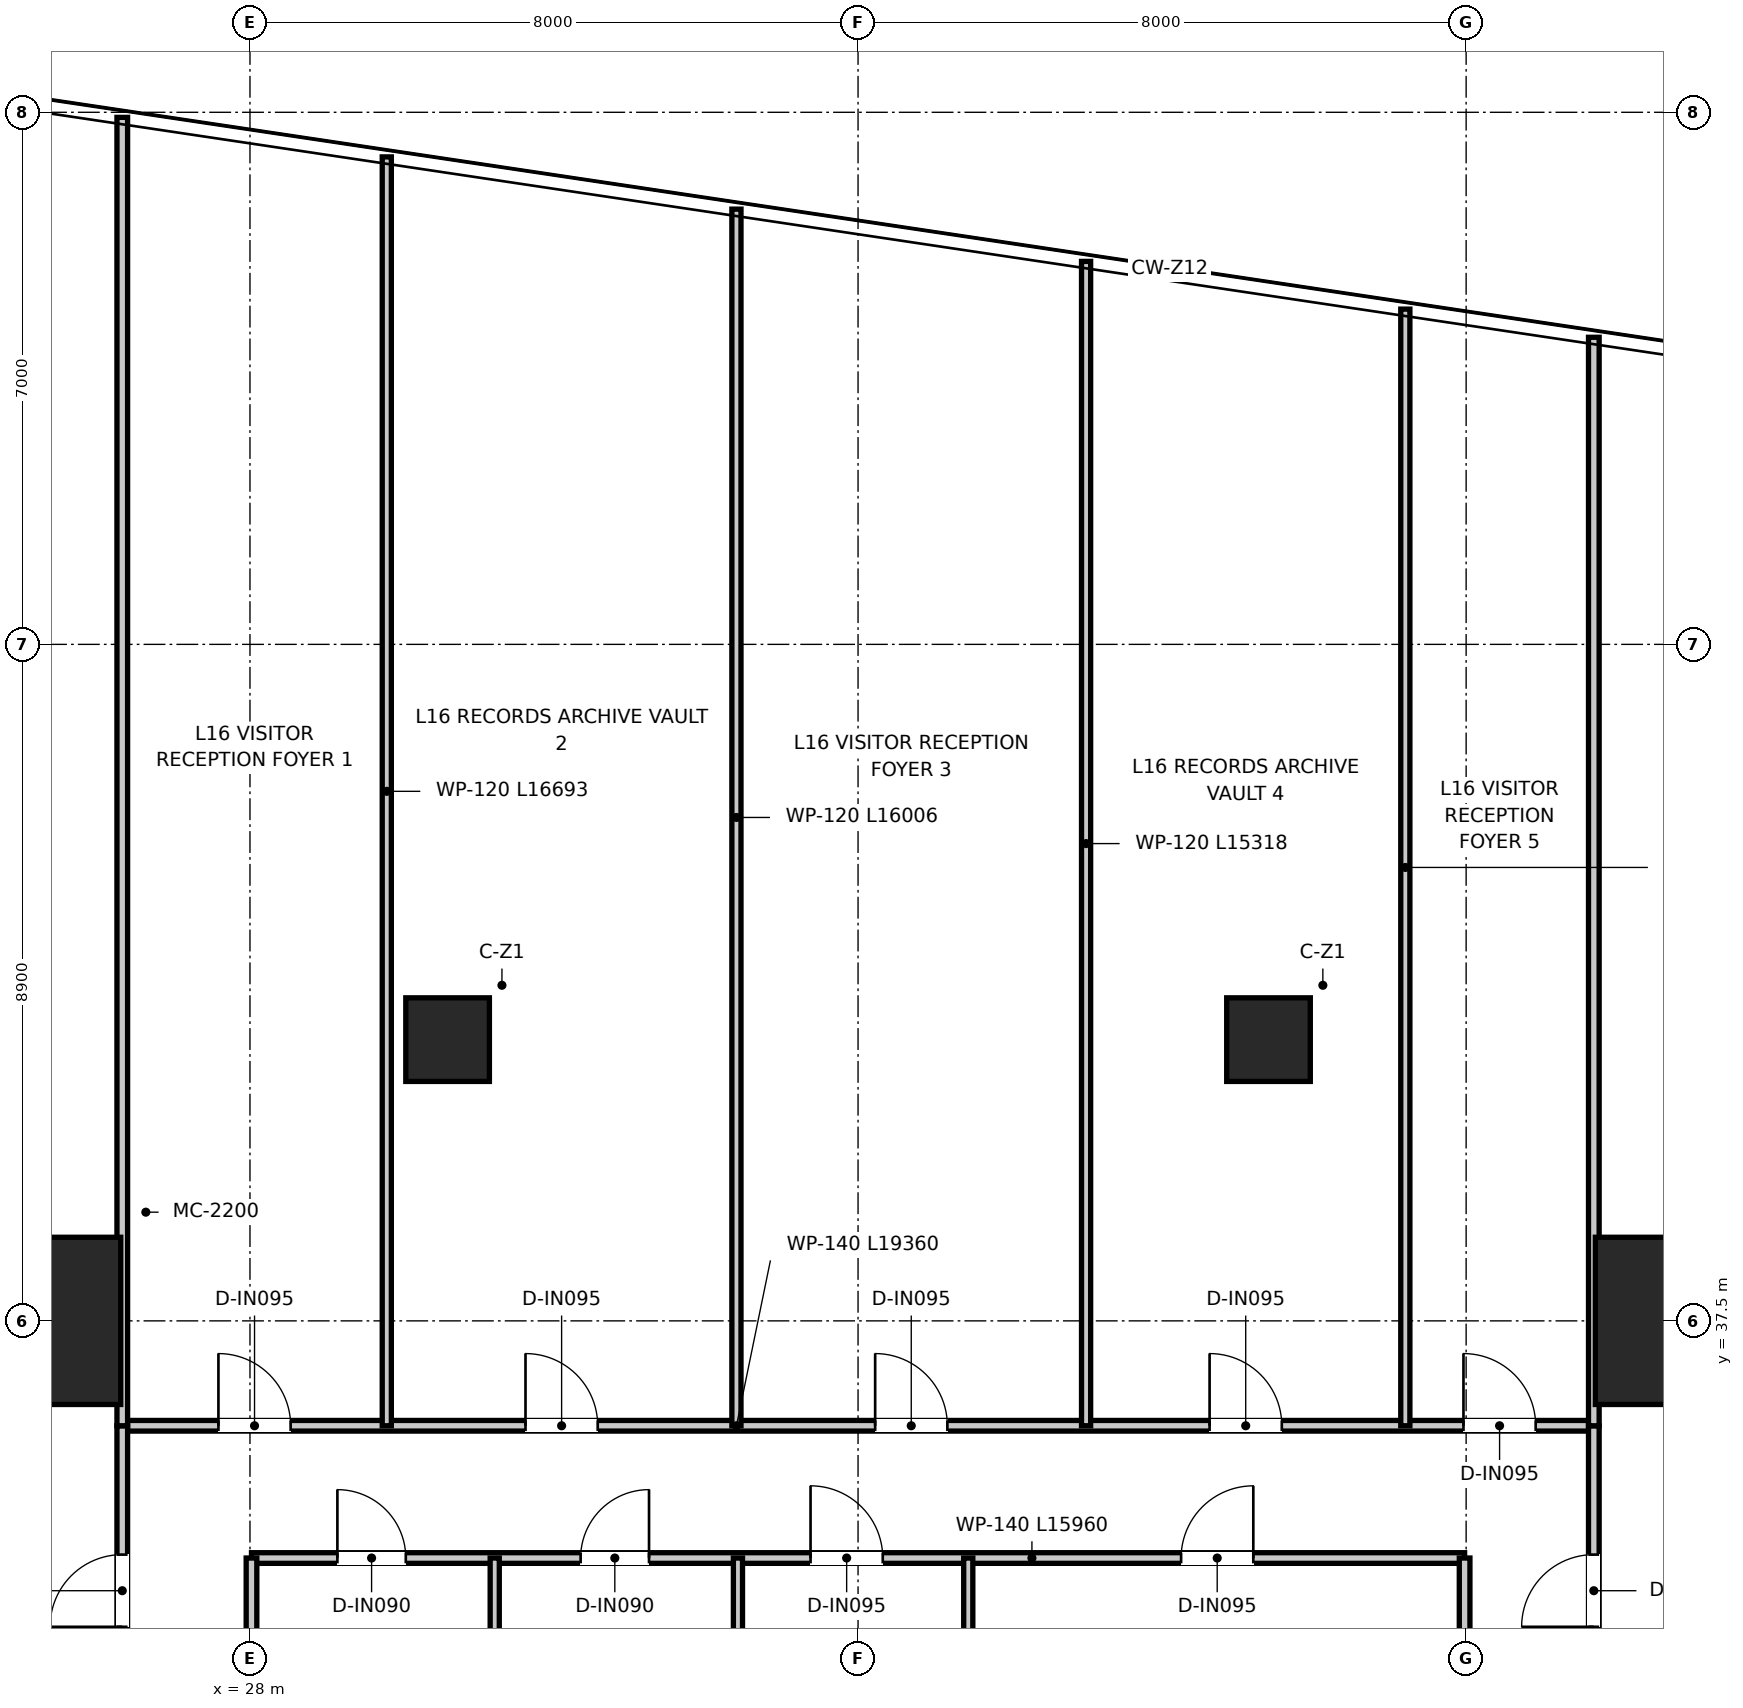
"""IFC4 building model, lengths in metres.
Left out: names, types, materials, properties, quantities, classifications, styles, units other than length and angle.
Written with IfcOpenShell. Run it as: python <this file> out.ifc"""

import sys

from ifc_helpers import new_model, si_unit, direction, frame, frame_2d, origin, origin_2d, place, context, subcontext, project, spatial, rectangle, extrude, source, transform, mapped, element, fill, save


model = new_model("IFC4")
c1 = context("Model", 3, precision=1e-05, world=origin(), true_north=direction((0.0, 1.0)))
c2 = subcontext(c1, "Body", "Model", "MODEL_VIEW")
j1 = project(units=[si_unit("LENGTHUNIT", "METRE"), si_unit("PLANEANGLEUNIT", "RADIAN")], contexts=[c1])
p1 = place(None, origin())
s1 = spatial("IfcSite", under=j1, at=p1, CompositionType="ELEMENT")
p2 = place(p1, origin())
s2 = spatial("IfcBuilding", under=s1, at=p2, CompositionType="ELEMENT")
p3 = place(p2, frame((0.0, 0.0, 68.45)))
s3 = spatial("IfcBuildingStorey", under=s2, at=p3, CompositionType="ELEMENT", Elevation=68.45)
m1 = source(origin(), c2, "Body", "SweptSolid", [
    extrude(rectangle(XDim=2.2, YDim=2.2, at=origin_2d()), origin(), (0.0, 0.0, 1.0), 3.95),
])
for number, where, z_axis, x_axis in (
    (1, (46.8, 37.5, 0.0), (0.0, 0.0, 1.0), (1.0, 0.0, 0.0)),
    (2, (25.2, 37.5, 0.0), (0.0, 0.0, 1.0), (1.0, 0.0, 0.0)),
):
    element("IfcColumn", number, at=place(p3, frame(where, z_axis=z_axis, x_axis=x_axis)), inside=s3, PredefinedType="USERDEFINED", context=c2, shape_type="MappedRepresentation", body=[
        mapped(m1, transform((0.0, 0.0, 0.0), x_axis=(1.0, 0.0, 0.0), y_axis=(0.0, 1.0, 0.0), z_axis=(0.0, 0.0, 1.0), scale=1.0)),
    ])
m2 = source(origin(), c2, "Body", "SweptSolid", [
    extrude(rectangle(XDim=1.1, YDim=1.1, at=origin_2d()), origin(), (0.0, 0.0, 1.0), 3.95),
])
for number, where, z_axis, x_axis in (
    (3, (30.6, 41.2, 0.0), (0.0, 0.0, 1.0), (1.0, 0.0, 0.0)),
    (4, (41.4, 41.2, 0.0), (0.0, 0.0, 1.0), (1.0, 0.0, 0.0)),
):
    element("IfcColumn", number, at=place(p3, frame(where, z_axis=z_axis, x_axis=x_axis)), inside=s3, PredefinedType="COLUMN", context=c2, shape_type="MappedRepresentation", body=[
        mapped(m2, transform((0.0, 0.0, 0.0), x_axis=(1.0, 0.0, 0.0), y_axis=(0.0, 1.0, 0.0), z_axis=(0.0, 0.0, 1.0), scale=1.0)),
    ])
p4 = place(p3, frame((28.02, 34.38, 0.0), z_axis=(0.0, 0.0, 1.0), x_axis=(1.0, 0.0, 0.0)))
e5 = element("IfcWall", 5, at=p4, inside=s3, PredefinedType="PARTITIONING", context=c2, shape_type="SweptSolid", body=[
    extrude(rectangle(XDim=15.96, YDim=0.14, at=frame_2d((7.98, 0.0))), origin(), (0.0, 0.0, 1.0), 3.08),
])
p5 = place(p4, frame((1.13, 0.0, 0.0)))
e6 = element("IfcOpeningElement", 6, at=p5, cuts=e5, PredefinedType="OPENING", context=c2, shape_type="SweptSolid", body=[
    extrude(rectangle(XDim=0.9, YDim=2.1, at=frame_2d((0.45, 1.05))), frame((0.0, 0.08, 0.0), z_axis=(0.0, -1.0, 0.0), x_axis=(1.0, 0.0, 0.0)), (0.0, 0.0, 1.0), 0.16),
])
p6 = place(p4, frame((4.33, 0.0, 0.0)))
e7 = element("IfcOpeningElement", 7, at=p6, cuts=e5, PredefinedType="OPENING", context=c2, shape_type="SweptSolid", body=[
    extrude(rectangle(XDim=0.9, YDim=2.1, at=frame_2d((0.45, 1.05))), frame((0.0, 0.08, 0.0), z_axis=(0.0, -1.0, 0.0), x_axis=(1.0, 0.0, 0.0)), (0.0, 0.0, 1.0), 0.16),
])
p7 = place(p4, frame((7.355, 0.0, 0.0)))
e8 = element("IfcOpeningElement", 8, at=p7, cuts=e5, PredefinedType="OPENING", context=c2, shape_type="SweptSolid", body=[
    extrude(rectangle(XDim=0.95, YDim=2.1, at=frame_2d((0.475, 1.05))), frame((0.0, 0.08, 0.0), z_axis=(0.0, -1.0, 0.0), x_axis=(1.0, 0.0, 0.0)), (0.0, 0.0, 1.0), 0.16),
])
p8 = place(p4, frame((12.23, 0.0, 0.0)))
e9 = element("IfcOpeningElement", 9, at=p8, cuts=e5, PredefinedType="OPENING", context=c2, shape_type="SweptSolid", body=[
    extrude(rectangle(XDim=0.95, YDim=2.1, at=frame_2d((0.475, 1.05))), frame((0.0, 0.08, 0.0), z_axis=(0.0, -1.0, 0.0), x_axis=(1.0, 0.0, 0.0)), (0.0, 0.0, 1.0), 0.16),
])
for number, where, z_axis, x_axis in (
    (10, (28.02, 28.64, 0.0), (0.0, 0.0, 1.0), (0.0, 1.0, 0.0)),
    (11, (43.98, 28.64, 0.0), (0.0, 0.0, 1.0), (0.0, 1.0, 0.0)),
):
    element("IfcWall", number, at=place(p3, frame(where, z_axis=z_axis, x_axis=x_axis)), inside=s3, PredefinedType="PARTITIONING", context=c2, shape_type="SweptSolid", body=[
        extrude(rectangle(XDim=5.74, YDim=0.14, at=frame_2d((2.87, 0.0))), origin(), (0.0, 0.0, 1.0), 3.22),
    ])
for number, where, z_axis, x_axis in (
    (12, (31.22, 30.74, 0.0), (0.0, 0.0, 1.0), (0.0, 1.0, 0.0)),
    (13, (34.42, 30.74, 0.0), (0.0, 0.0, 1.0), (0.0, 1.0, 0.0)),
    (14, (37.45, 30.74, 0.0), (0.0, 0.0, 1.0), (0.0, 1.0, 0.0)),
):
    element("IfcWall", number, at=place(p3, frame(where, z_axis=z_axis, x_axis=x_axis)), inside=s3, PredefinedType="PARTITIONING", context=c2, shape_type="SweptSolid", body=[
        extrude(rectangle(XDim=3.64, YDim=0.12, at=frame_2d((1.82, 0.0))), origin(), (0.0, 0.0, 1.0), 3.12),
    ])
p9 = place(p3, frame((26.32, 36.12, 0.0), z_axis=(0.0, 0.0, 1.0), x_axis=(1.0, 0.0, 0.0)))
e15 = element("IfcWall", 15, at=p9, inside=s3, PredefinedType="PARTITIONING", context=c2, shape_type="SweptSolid", body=[
    extrude(rectangle(XDim=19.36, YDim=0.14, at=frame_2d((9.68, 0.0))), origin(), (0.0, 0.0, 1.0), 3.08),
])
p10 = place(p9, frame((1.265, 0.0, 0.0)))
e16 = element("IfcOpeningElement", 16, at=p10, cuts=e15, PredefinedType="OPENING", context=c2, shape_type="SweptSolid", body=[
    extrude(rectangle(XDim=0.95, YDim=2.1, at=frame_2d((0.475, 1.05))), frame((0.0, 0.08, 0.0), z_axis=(0.0, -1.0, 0.0), x_axis=(1.0, 0.0, 0.0)), (0.0, 0.0, 1.0), 0.16),
])
p11 = place(p9, frame((5.305, 0.0, 0.0)))
e17 = element("IfcOpeningElement", 17, at=p11, cuts=e15, PredefinedType="OPENING", context=c2, shape_type="SweptSolid", body=[
    extrude(rectangle(XDim=0.95, YDim=2.1, at=frame_2d((0.475, 1.05))), frame((0.0, 0.08, 0.0), z_axis=(0.0, -1.0, 0.0), x_axis=(1.0, 0.0, 0.0)), (0.0, 0.0, 1.0), 0.16),
])
p12 = place(p9, frame((9.905, 0.0, 0.0)))
e18 = element("IfcOpeningElement", 18, at=p12, cuts=e15, PredefinedType="OPENING", context=c2, shape_type="SweptSolid", body=[
    extrude(rectangle(XDim=0.95, YDim=2.1, at=frame_2d((0.475, 1.05))), frame((0.0, 0.08, 0.0), z_axis=(0.0, -1.0, 0.0), x_axis=(1.0, 0.0, 0.0)), (0.0, 0.0, 1.0), 0.16),
])
p13 = place(p9, frame((14.305, 0.0, 0.0)))
e19 = element("IfcOpeningElement", 19, at=p13, cuts=e15, PredefinedType="OPENING", context=c2, shape_type="SweptSolid", body=[
    extrude(rectangle(XDim=0.95, YDim=2.1, at=frame_2d((0.475, 1.05))), frame((0.0, 0.08, 0.0), z_axis=(0.0, -1.0, 0.0), x_axis=(1.0, 0.0, 0.0)), (0.0, 0.0, 1.0), 0.16),
])
p14 = place(p9, frame((17.645, 0.0, 0.0)))
e20 = element("IfcOpeningElement", 20, at=p14, cuts=e15, PredefinedType="OPENING", context=c2, shape_type="SweptSolid", body=[
    extrude(rectangle(XDim=0.95, YDim=2.1, at=frame_2d((0.475, 1.05))), frame((0.0, 0.08, 0.0), z_axis=(0.0, -1.0, 0.0), x_axis=(1.0, 0.0, 0.0)), (0.0, 0.0, 1.0), 0.16),
])
p15 = place(p3, frame((26.32, 10.5, 0.0), z_axis=(0.0, 0.0, 1.0), x_axis=(0.0, 1.0, 0.0)))
e21 = element("IfcWall", 21, at=p15, inside=s3, PredefinedType="PARTITIONING", context=c2, shape_type="SweptSolid", body=[
    extrude(rectangle(XDim=25.62, YDim=0.14, at=frame_2d((12.81, 0.0))), origin(), (0.0, 0.0, 1.0), 2.97),
])
p16 = place(p15, frame((7.775, 0.0, 0.0)))
e22 = element("IfcOpeningElement", 22, at=p16, cuts=e21, PredefinedType="OPENING", context=c2, shape_type="SweptSolid", body=[
    extrude(rectangle(XDim=0.95, YDim=2.1, at=frame_2d((0.475, 1.05))), frame((0.0, 0.08, 0.0), z_axis=(0.0, -1.0, 0.0), x_axis=(1.0, 0.0, 0.0)), (0.0, 0.0, 1.0), 0.16),
])
p17 = place(p15, frame((11.275, 0.0, 0.0)))
e23 = element("IfcOpeningElement", 23, at=p17, cuts=e21, PredefinedType="OPENING", context=c2, shape_type="SweptSolid", body=[
    extrude(rectangle(XDim=0.95, YDim=2.1, at=frame_2d((0.475, 1.05))), frame((0.0, 0.08, 0.0), z_axis=(0.0, -1.0, 0.0), x_axis=(1.0, 0.0, 0.0)), (0.0, 0.0, 1.0), 0.16),
])
p18 = place(p15, frame((15.775, 0.0, 0.0)))
e24 = element("IfcOpeningElement", 24, at=p18, cuts=e21, PredefinedType="OPENING", context=c2, shape_type="SweptSolid", body=[
    extrude(rectangle(XDim=0.95, YDim=2.1, at=frame_2d((0.475, 1.05))), frame((0.0, 0.08, 0.0), z_axis=(0.0, -1.0, 0.0), x_axis=(1.0, 0.0, 0.0)), (0.0, 0.0, 1.0), 0.16),
])
p19 = place(p15, frame((20.125, 0.0, 0.0)))
e25 = element("IfcOpeningElement", 25, at=p19, cuts=e21, PredefinedType="OPENING", context=c2, shape_type="SweptSolid", body=[
    extrude(rectangle(XDim=0.95, YDim=2.1, at=frame_2d((0.475, 1.05))), frame((0.0, 0.08, 0.0), z_axis=(0.0, -1.0, 0.0), x_axis=(1.0, 0.0, 0.0)), (0.0, 0.0, 1.0), 0.16),
])
p20 = place(p15, frame((22.975, 0.0, 0.0)))
e26 = element("IfcOpeningElement", 26, at=p20, cuts=e21, PredefinedType="OPENING", context=c2, shape_type="SweptSolid", body=[
    extrude(rectangle(XDim=0.95, YDim=2.1, at=frame_2d((0.475, 1.05))), frame((0.0, 0.08, 0.0), z_axis=(0.0, -1.0, 0.0), x_axis=(1.0, 0.0, 0.0)), (0.0, 0.0, 1.0), 0.16),
])
p21 = place(p3, frame((45.68, 10.5, 0.0), z_axis=(0.0, 0.0, 1.0), x_axis=(0.0, 1.0, 0.0)))
e27 = element("IfcWall", 27, at=p21, inside=s3, PredefinedType="PARTITIONING", context=c2, shape_type="SweptSolid", body=[
    extrude(rectangle(XDim=25.62, YDim=0.14, at=frame_2d((12.81, 0.0))), origin(), (0.0, 0.0, 1.0), 2.97),
])
p22 = place(p21, frame((7.775, 0.0, 0.0)))
e28 = element("IfcOpeningElement", 28, at=p22, cuts=e27, PredefinedType="OPENING", context=c2, shape_type="SweptSolid", body=[
    extrude(rectangle(XDim=0.95, YDim=2.1, at=frame_2d((0.475, 1.05))), frame((0.0, 0.08, 0.0), z_axis=(0.0, -1.0, 0.0), x_axis=(1.0, 0.0, 0.0)), (0.0, 0.0, 1.0), 0.16),
])
p23 = place(p21, frame((11.275, 0.0, 0.0)))
e29 = element("IfcOpeningElement", 29, at=p23, cuts=e27, PredefinedType="OPENING", context=c2, shape_type="SweptSolid", body=[
    extrude(rectangle(XDim=0.95, YDim=2.1, at=frame_2d((0.475, 1.05))), frame((0.0, 0.08, 0.0), z_axis=(0.0, -1.0, 0.0), x_axis=(1.0, 0.0, 0.0)), (0.0, 0.0, 1.0), 0.16),
])
p24 = place(p21, frame((15.775, 0.0, 0.0)))
e30 = element("IfcOpeningElement", 30, at=p24, cuts=e27, PredefinedType="OPENING", context=c2, shape_type="SweptSolid", body=[
    extrude(rectangle(XDim=0.95, YDim=2.1, at=frame_2d((0.475, 1.05))), frame((0.0, 0.08, 0.0), z_axis=(0.0, -1.0, 0.0), x_axis=(1.0, 0.0, 0.0)), (0.0, 0.0, 1.0), 0.16),
])
p25 = place(p21, frame((20.125, 0.0, 0.0)))
e31 = element("IfcOpeningElement", 31, at=p25, cuts=e27, PredefinedType="OPENING", context=c2, shape_type="SweptSolid", body=[
    extrude(rectangle(XDim=0.95, YDim=2.1, at=frame_2d((0.475, 1.05))), frame((0.0, 0.08, 0.0), z_axis=(0.0, -1.0, 0.0), x_axis=(1.0, 0.0, 0.0)), (0.0, 0.0, 1.0), 0.16),
])
p26 = place(p21, frame((22.975, 0.0, 0.0)))
e32 = element("IfcOpeningElement", 32, at=p26, cuts=e27, PredefinedType="OPENING", context=c2, shape_type="SweptSolid", body=[
    extrude(rectangle(XDim=0.95, YDim=2.1, at=frame_2d((0.475, 1.05))), frame((0.0, 0.08, 0.0), z_axis=(0.0, -1.0, 0.0), x_axis=(1.0, 0.0, 0.0)), (0.0, 0.0, 1.0), 0.16),
])
p27 = place(p3, frame((26.32, 36.12, 0.0), z_axis=(0.0, 0.0, 1.0), x_axis=(0.0, 1.0, 0.0)))
e33 = element("IfcWall", 33, at=p27, inside=s3, PredefinedType="PARTITIONING", context=c2, shape_type="SweptSolid", body=[
    extrude(rectangle(XDim=17.213, YDim=0.14, at=frame_2d((8.606, 0.0))), origin(), (0.0, 0.0, 1.0), 2.97),
])
p28 = place(p3, frame((45.68, 36.12, 0.0), z_axis=(0.0, 0.0, 1.0), x_axis=(0.0, 1.0, 0.0)))
e34 = element("IfcWall", 34, at=p28, inside=s3, PredefinedType="PARTITIONING", context=c2, shape_type="SweptSolid", body=[
    extrude(rectangle(XDim=14.32, YDim=0.14, at=frame_2d((7.16, 0.0))), origin(), (0.0, 0.0, 1.0), 2.97),
])
p29 = place(p3, frame((29.8, 36.12, 0.0), z_axis=(0.0, 0.0, 1.0), x_axis=(0.0, 1.0, 0.0)))
e35 = element("IfcWall", 35, at=p29, inside=s3, PredefinedType="PARTITIONING", context=c2, shape_type="SweptSolid", body=[
    extrude(rectangle(XDim=16.693, YDim=0.12, at=frame_2d((8.347, 0.0))), origin(), (0.0, 0.0, 1.0), 2.97),
])
p30 = place(p3, frame((34.4, 36.12, 0.0), z_axis=(0.0, 0.0, 1.0), x_axis=(0.0, 1.0, 0.0)))
e36 = element("IfcWall", 36, at=p30, inside=s3, PredefinedType="PARTITIONING", context=c2, shape_type="SweptSolid", body=[
    extrude(rectangle(XDim=16.006, YDim=0.12, at=frame_2d((8.003, 0.0))), origin(), (0.0, 0.0, 1.0), 2.97),
])
p31 = place(p3, frame((39.0, 36.12, 0.0), z_axis=(0.0, 0.0, 1.0), x_axis=(0.0, 1.0, 0.0)))
e37 = element("IfcWall", 37, at=p31, inside=s3, PredefinedType="PARTITIONING", context=c2, shape_type="SweptSolid", body=[
    extrude(rectangle(XDim=15.318, YDim=0.12, at=frame_2d((7.659, 0.0))), origin(), (0.0, 0.0, 1.0), 2.97),
])
p32 = place(p3, frame((43.2, 36.12, 0.0), z_axis=(0.0, 0.0, 1.0), x_axis=(0.0, 1.0, 0.0)))
e38 = element("IfcWall", 38, at=p32, inside=s3, PredefinedType="PARTITIONING", context=c2, shape_type="SweptSolid", body=[
    extrude(rectangle(XDim=14.69, YDim=0.12, at=frame_2d((7.345, 0.0))), origin(), (0.0, 0.0, 1.0), 2.97),
])
p33 = place(p5, origin())
e39 = element("IfcDoor", 39, at=p33, inside=s3, OperationType="SINGLE_SWING_LEFT", PredefinedType="DOOR", context=c2, shape_type="SweptSolid", body=[
    extrude(rectangle(XDim=0.9, YDim=2.1, at=frame_2d((0.45, 1.05))), frame((0.0, 0.025, 0.0), z_axis=(0.0, -1.0, 0.0), x_axis=(1.0, 0.0, 0.0)), (0.0, 0.0, 1.0), 0.05),
])
fill(e6, e39)
p34 = place(p6, origin())
e40 = element("IfcDoor", 40, at=p34, inside=s3, OperationType="SINGLE_SWING_RIGHT", PredefinedType="DOOR", context=c2, shape_type="SweptSolid", body=[
    extrude(rectangle(XDim=0.9, YDim=2.1, at=frame_2d((0.45, 1.05))), frame((0.0, 0.025, 0.0), z_axis=(0.0, -1.0, 0.0), x_axis=(1.0, 0.0, 0.0)), (0.0, 0.0, 1.0), 0.05),
])
fill(e7, e40)
p35 = place(p7, origin())
e41 = element("IfcDoor", 41, at=p35, inside=s3, OperationType="SINGLE_SWING_LEFT", PredefinedType="DOOR", context=c2, shape_type="SweptSolid", body=[
    extrude(rectangle(XDim=0.95, YDim=2.1, at=frame_2d((0.475, 1.05))), frame((0.0, 0.025, 0.0), z_axis=(0.0, -1.0, 0.0), x_axis=(1.0, 0.0, 0.0)), (0.0, 0.0, 1.0), 0.05),
])
fill(e8, e41)
p36 = place(p8, origin())
e42 = element("IfcDoor", 42, at=p36, inside=s3, OperationType="SINGLE_SWING_RIGHT", PredefinedType="DOOR", context=c2, shape_type="SweptSolid", body=[
    extrude(rectangle(XDim=0.95, YDim=2.1, at=frame_2d((0.475, 1.05))), frame((0.0, 0.025, 0.0), z_axis=(0.0, -1.0, 0.0), x_axis=(1.0, 0.0, 0.0)), (0.0, 0.0, 1.0), 0.05),
])
fill(e9, e42)
p37 = place(p10, origin())
e43 = element("IfcDoor", 43, at=p37, inside=s3, OperationType="SINGLE_SWING_LEFT", PredefinedType="DOOR", context=c2, shape_type="SweptSolid", body=[
    extrude(rectangle(XDim=0.95, YDim=2.1, at=frame_2d((0.475, 1.05))), frame((0.0, 0.025, 0.0), z_axis=(0.0, -1.0, 0.0), x_axis=(1.0, 0.0, 0.0)), (0.0, 0.0, 1.0), 0.05),
])
fill(e16, e43)
p38 = place(p11, origin())
e44 = element("IfcDoor", 44, at=p38, inside=s3, OperationType="SINGLE_SWING_LEFT", PredefinedType="DOOR", context=c2, shape_type="SweptSolid", body=[
    extrude(rectangle(XDim=0.95, YDim=2.1, at=frame_2d((0.475, 1.05))), frame((0.0, 0.025, 0.0), z_axis=(0.0, -1.0, 0.0), x_axis=(1.0, 0.0, 0.0)), (0.0, 0.0, 1.0), 0.05),
])
fill(e17, e44)
p39 = place(p12, origin())
e45 = element("IfcDoor", 45, at=p39, inside=s3, OperationType="SINGLE_SWING_LEFT", PredefinedType="DOOR", context=c2, shape_type="SweptSolid", body=[
    extrude(rectangle(XDim=0.95, YDim=2.1, at=frame_2d((0.475, 1.05))), frame((0.0, 0.025, 0.0), z_axis=(0.0, -1.0, 0.0), x_axis=(1.0, 0.0, 0.0)), (0.0, 0.0, 1.0), 0.05),
])
fill(e18, e45)
p40 = place(p13, origin())
e46 = element("IfcDoor", 46, at=p40, inside=s3, OperationType="SINGLE_SWING_LEFT", PredefinedType="DOOR", context=c2, shape_type="SweptSolid", body=[
    extrude(rectangle(XDim=0.95, YDim=2.1, at=frame_2d((0.475, 1.05))), frame((0.0, 0.025, 0.0), z_axis=(0.0, -1.0, 0.0), x_axis=(1.0, 0.0, 0.0)), (0.0, 0.0, 1.0), 0.05),
])
fill(e19, e46)
p41 = place(p14, origin())
e47 = element("IfcDoor", 47, at=p41, inside=s3, OperationType="SINGLE_SWING_LEFT", PredefinedType="DOOR", context=c2, shape_type="SweptSolid", body=[
    extrude(rectangle(XDim=0.95, YDim=2.1, at=frame_2d((0.475, 1.05))), frame((0.0, 0.025, 0.0), z_axis=(0.0, -1.0, 0.0), x_axis=(1.0, 0.0, 0.0)), (0.0, 0.0, 1.0), 0.05),
])
fill(e20, e47)
p42 = place(p20, origin())
e48 = element("IfcDoor", 48, at=p42, inside=s3, OperationType="SINGLE_SWING_LEFT", PredefinedType="DOOR", context=c2, shape_type="SweptSolid", body=[
    extrude(rectangle(XDim=0.95, YDim=2.1, at=frame_2d((0.475, 1.05))), frame((0.0, 0.025, 0.0), z_axis=(0.0, -1.0, 0.0), x_axis=(1.0, 0.0, 0.0)), (0.0, 0.0, 1.0), 0.05),
])
fill(e26, e48)
p43 = place(p26, origin())
e49 = element("IfcDoor", 49, at=p43, inside=s3, OperationType="SINGLE_SWING_LEFT", PredefinedType="DOOR", context=c2, shape_type="SweptSolid", body=[
    extrude(rectangle(XDim=0.95, YDim=2.1, at=frame_2d((0.475, 1.05))), frame((0.0, 0.025, 0.0), z_axis=(0.0, -1.0, 0.0), x_axis=(1.0, 0.0, 0.0)), (0.0, 0.0, 1.0), 0.05),
])
fill(e32, e49)
save(model, sys.argv[1])
